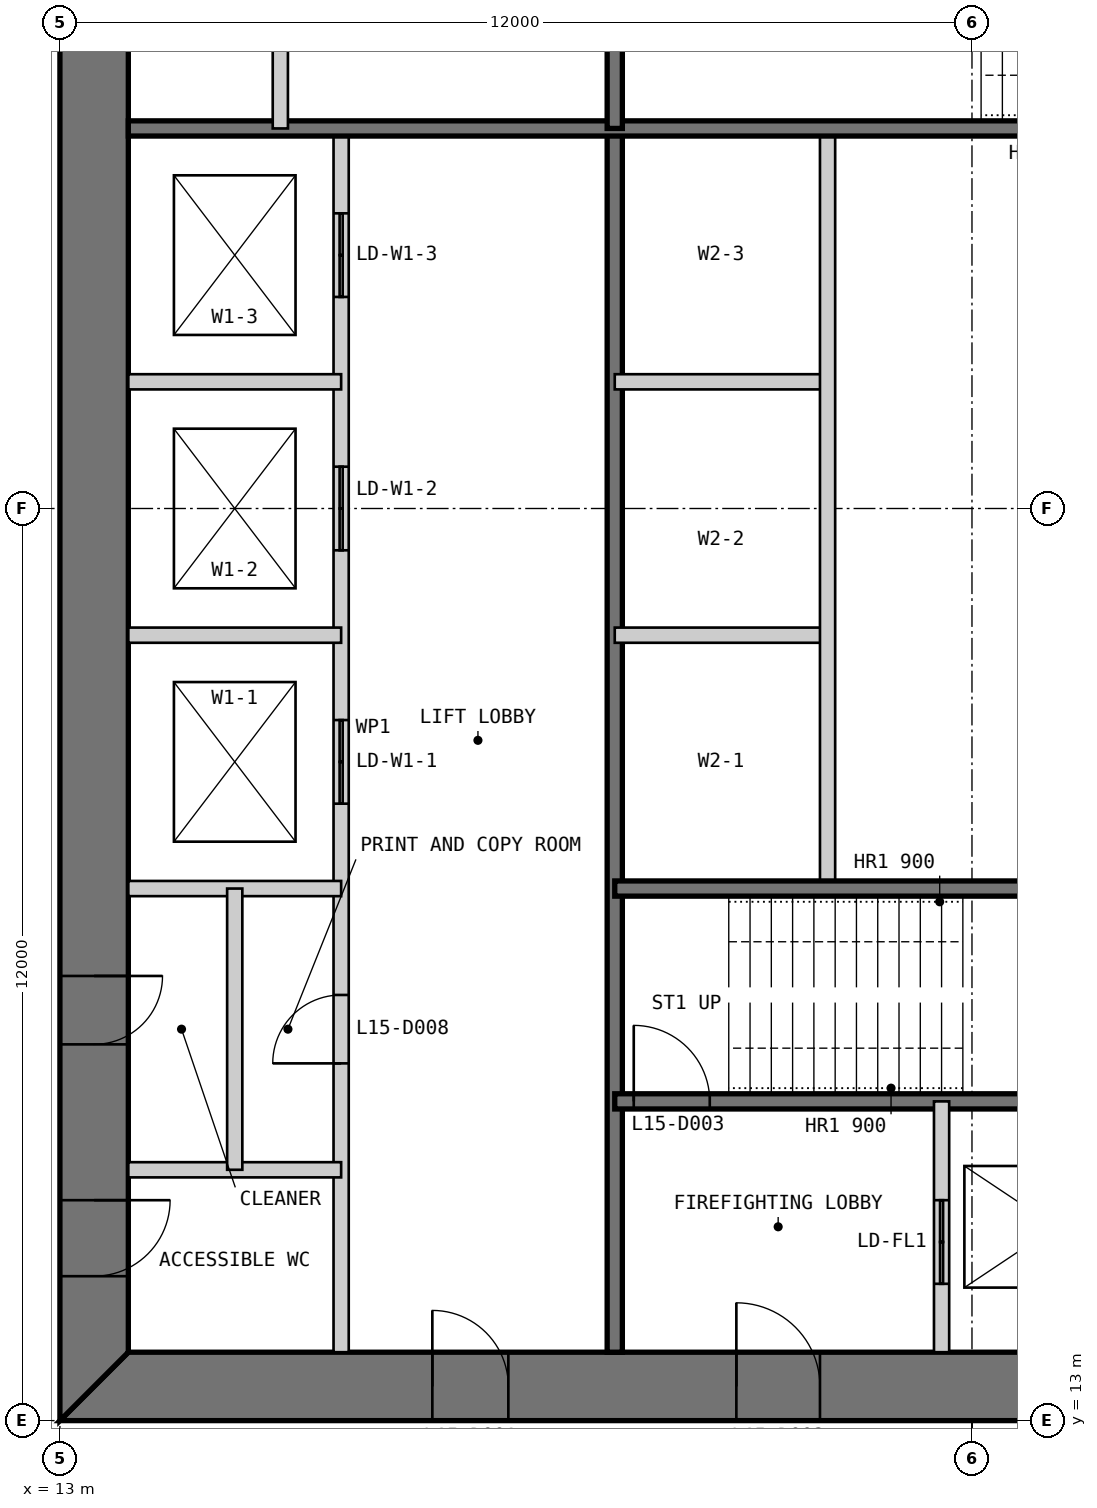
"""IFC4 building model, lengths in metres.
Left out: names, types, materials, properties, quantities, classifications, styles, units other than length and angle.
Written with IfcOpenShell. Run it as: python <this file> out.ifc"""

import sys

from ifc_helpers import new_model, si_unit, direction, frame, frame_2d, origin, place, context, subcontext, project, spatial, polyline, rectangle, outline, extrude, element, fill, save


model = new_model("IFC4")
c1 = context("Model", 3, precision=1e-05, world=origin(), true_north=direction((0.0, 1.0)))
c2 = subcontext(c1, "Body", "Model", "MODEL_VIEW")
j1 = project(units=[si_unit("LENGTHUNIT", "METRE"), si_unit("PLANEANGLEUNIT", "RADIAN")], contexts=[c1])
p1 = place(None, origin())
s1 = spatial("IfcSite", under=j1, at=p1, CompositionType="ELEMENT")
p2 = place(p1, origin())
s2 = spatial("IfcBuilding", under=s1, at=p2, CompositionType="ELEMENT")
p3 = place(p2, frame((0.0, 0.0, 67.0)))
s3 = spatial("IfcBuildingStorey", under=s2, at=p3, CompositionType="ELEMENT", Elevation=67.0)
p4 = place(p3, frame((13.0, 13.45, 0.0), z_axis=(0.0, 0.0, 1.0), x_axis=(1.0, 0.0, 0.0)))
e1 = element("IfcWall", 1, at=p4, inside=s3, PredefinedType="SHEAR", context=c2, shape_type="SweptSolid", body=[
    extrude(outline(polyline([(0.0, -0.45), (24.0, -0.45), (23.1, 0.45), (0.9, 0.45), (0.0, -0.45)])), origin(), (0.0, 0.0, 1.0), 4.0),
])
p5 = place(p4, frame((4.9, 0.0, 0.0)))
e2 = element("IfcOpeningElement", 2, at=p5, cuts=e1, PredefinedType="OPENING", context=c2, shape_type="SweptSolid", body=[
    extrude(rectangle(XDim=1.0, YDim=2.2, at=frame_2d((0.5, 1.1))), frame((0.0, 0.46, 0.0), z_axis=(0.0, -1.0, 0.0), x_axis=(1.0, 0.0, 0.0)), (0.0, 0.0, 1.0), 0.92),
])
p6 = place(p4, frame((8.9, 0.0, 0.0)))
e3 = element("IfcOpeningElement", 3, at=p6, cuts=e1, PredefinedType="OPENING", context=c2, shape_type="SweptSolid", body=[
    extrude(rectangle(XDim=1.1, YDim=2.2, at=frame_2d((0.55, 1.1))), frame((0.0, 0.46, 0.0), z_axis=(0.0, -1.0, 0.0), x_axis=(1.0, 0.0, 0.0)), (0.0, 0.0, 1.0), 0.92),
])
p7 = place(p4, frame((15.05, 0.0, 0.0)))
e4 = element("IfcOpeningElement", 4, at=p7, cuts=e1, PredefinedType="OPENING", context=c2, shape_type="SweptSolid", body=[
    extrude(rectangle(XDim=0.9, YDim=2.2, at=frame_2d((0.45, 1.1))), frame((0.0, 0.46, 0.0), z_axis=(0.0, -1.0, 0.0), x_axis=(1.0, 0.0, 0.0)), (0.0, 0.0, 1.0), 0.92),
])
p8 = place(p4, frame((17.9, 0.0, 0.0)))
e5 = element("IfcOpeningElement", 5, at=p8, cuts=e1, PredefinedType="OPENING", context=c2, shape_type="SweptSolid", body=[
    extrude(rectangle(XDim=1.0, YDim=2.2, at=frame_2d((0.5, 1.1))), frame((0.0, 0.46, 0.0), z_axis=(0.0, -1.0, 0.0), x_axis=(1.0, 0.0, 0.0)), (0.0, 0.0, 1.0), 0.92),
])
p9 = place(p4, frame((21.4, 0.0, 0.0)))
e6 = element("IfcOpeningElement", 6, at=p9, cuts=e1, PredefinedType="OPENING", context=c2, shape_type="SweptSolid", body=[
    extrude(rectangle(XDim=1.0, YDim=2.2, at=frame_2d((0.5, 1.1))), frame((0.0, 0.46, 0.0), z_axis=(0.0, -1.0, 0.0), x_axis=(1.0, 0.0, 0.0)), (0.0, 0.0, 1.0), 0.92),
])
p10 = place(p3, frame((13.45, 36.1, 0.0), z_axis=(0.0, 0.0, 1.0), x_axis=(0.0, -1.0, 0.0)))
e7 = element("IfcWall", 7, at=p10, inside=s3, PredefinedType="SHEAR", context=c2, shape_type="SweptSolid", body=[
    extrude(outline(polyline([(-0.9, -0.45), (23.1, -0.45), (22.2, 0.45), (0.0, 0.45), (-0.9, -0.45)])), origin(), (0.0, 0.0, 1.0), 4.0),
])
p11 = place(p10, frame((20.2, 0.0, 0.0)))
e8 = element("IfcOpeningElement", 8, at=p11, cuts=e7, PredefinedType="OPENING", context=c2, shape_type="SweptSolid", body=[
    extrude(rectangle(XDim=1.0, YDim=2.2, at=frame_2d((0.5, 1.1))), frame((0.0, 0.46, 0.0), z_axis=(0.0, -1.0, 0.0), x_axis=(1.0, 0.0, 0.0)), (0.0, 0.0, 1.0), 0.92),
])
p12 = place(p10, frame((17.25, 0.0, 0.0)))
e9 = element("IfcOpeningElement", 9, at=p12, cuts=e7, PredefinedType="OPENING", context=c2, shape_type="SweptSolid", body=[
    extrude(rectangle(XDim=0.9, YDim=2.2, at=frame_2d((0.45, 1.1))), frame((0.0, 0.46, 0.0), z_axis=(0.0, -1.0, 0.0), x_axis=(1.0, 0.0, 0.0)), (0.0, 0.0, 1.0), 0.92),
])
p13 = place(p3, frame((16.7, 13.9, 0.0), z_axis=(0.0, 0.0, 1.0), x_axis=(0.0, 1.0, 0.0)))
e10 = element("IfcWall", 10, at=p13, inside=s3, PredefinedType="PARTITIONING", context=c2, shape_type="SweptSolid", body=[
    extrude(rectangle(XDim=16.1, YDim=0.2, at=frame_2d((8.05, 0.0))), origin(), (0.0, 0.0, 1.0), 3.8),
])
p14 = place(p13, frame((3.8, 0.0, 0.0)))
e11 = element("IfcOpeningElement", 11, at=p14, cuts=e10, PredefinedType="OPENING", context=c2, shape_type="SweptSolid", body=[
    extrude(rectangle(XDim=0.9, YDim=2.2, at=frame_2d((0.45, 1.1))), frame((0.0, 0.11, 0.0), z_axis=(0.0, -1.0, 0.0), x_axis=(1.0, 0.0, 0.0)), (0.0, 0.0, 1.0), 0.22),
])
p15 = place(p13, frame((7.217, 0.0, 0.0)))
e12 = element("IfcOpeningElement", 12, at=p15, cuts=e10, PredefinedType="OPENING", context=c2, shape_type="SweptSolid", body=[
    extrude(rectangle(XDim=1.1, YDim=2.2, at=frame_2d((0.55, 1.1))), frame((0.0, 0.11, 0.0), z_axis=(0.0, -1.0, 0.0), x_axis=(1.0, 0.0, 0.0)), (0.0, 0.0, 1.0), 0.22),
])
p16 = place(p13, frame((10.55, 0.0, 0.0)))
e13 = element("IfcOpeningElement", 13, at=p16, cuts=e10, PredefinedType="OPENING", context=c2, shape_type="SweptSolid", body=[
    extrude(rectangle(XDim=1.1, YDim=2.2, at=frame_2d((0.55, 1.1))), frame((0.0, 0.11, 0.0), z_axis=(0.0, -1.0, 0.0), x_axis=(1.0, 0.0, 0.0)), (0.0, 0.0, 1.0), 0.22),
])
p17 = place(p13, frame((13.883, 0.0, 0.0)))
e14 = element("IfcOpeningElement", 14, at=p17, cuts=e10, PredefinedType="OPENING", context=c2, shape_type="SweptSolid", body=[
    extrude(rectangle(XDim=1.1, YDim=2.2, at=frame_2d((0.55, 1.1))), frame((0.0, 0.11, 0.0), z_axis=(0.0, -1.0, 0.0), x_axis=(1.0, 0.0, 0.0)), (0.0, 0.0, 1.0), 0.22),
])
p18 = place(p3, frame((20.3, 13.9, 0.0), z_axis=(0.0, 0.0, 1.0), x_axis=(0.0, 1.0, 0.0)))
e15 = element("IfcWall", 15, at=p18, inside=s3, PredefinedType="SOLIDWALL", context=c2, shape_type="SweptSolid", body=[
    extrude(rectangle(XDim=16.1, YDim=0.2, at=frame_2d((8.05, 0.0))), origin(), (0.0, 0.0, 1.0), 3.8),
])
for number, where, z_axis, x_axis in (
    (16, (13.9, 20.0, 0.0), (0.0, 0.0, 1.0), (1.0, 0.0, 0.0)),
    (17, (13.9, 23.333, 0.0), (0.0, 0.0, 1.0), (1.0, 0.0, 0.0)),
    (18, (13.9, 26.667, 0.0), (0.0, 0.0, 1.0), (1.0, 0.0, 0.0)),
    (19, (20.3, 23.333, 0.0), (0.0, 0.0, 1.0), (1.0, 0.0, 0.0)),
    (20, (20.3, 26.667, 0.0), (0.0, 0.0, 1.0), (1.0, 0.0, 0.0)),
):
    element("IfcWall", number, at=place(p3, frame(where, z_axis=z_axis, x_axis=x_axis)), inside=s3, PredefinedType="PARTITIONING", context=c2, shape_type="SweptSolid", body=[
        extrude(rectangle(XDim=2.8, YDim=0.2, at=frame_2d((1.4, 0.0))), origin(), (0.0, 0.0, 1.0), 3.8),
    ])
p19 = place(p3, frame((23.1, 20.0, 0.0), z_axis=(0.0, 0.0, 1.0), x_axis=(0.0, 1.0, 0.0)))
e21 = element("IfcWall", 21, at=p19, inside=s3, PredefinedType="PARTITIONING", context=c2, shape_type="SweptSolid", body=[
    extrude(rectangle(XDim=10.0, YDim=0.2, at=frame_2d((5.0, 0.0))), origin(), (0.0, 0.0, 1.0), 3.8),
])
p20 = place(p3, frame((20.3, 17.2, 0.0), z_axis=(0.0, 0.0, 1.0), x_axis=(1.0, 0.0, 0.0)))
e22 = element("IfcWall", 22, at=p20, inside=s3, PredefinedType="SOLIDWALL", context=c2, shape_type="SweptSolid", body=[
    extrude(rectangle(XDim=9.4, YDim=0.2, at=frame_2d((4.7, 0.0))), origin(), (0.0, 0.0, 1.0), 3.8),
])
p21 = place(p20, frame((0.25, 0.0, 0.0)))
e23 = element("IfcOpeningElement", 23, at=p21, cuts=e22, PredefinedType="OPENING", context=c2, shape_type="SweptSolid", body=[
    extrude(rectangle(XDim=1.0, YDim=2.2, at=frame_2d((0.5, 1.1))), frame((0.0, 0.11, 0.0), z_axis=(0.0, -1.0, 0.0), x_axis=(1.0, 0.0, 0.0)), (0.0, 0.0, 1.0), 0.22),
])
p22 = place(p3, frame((20.3, 20.0, 0.0), z_axis=(0.0, 0.0, 1.0), x_axis=(1.0, 0.0, 0.0)))
e24 = element("IfcWall", 24, at=p22, inside=s3, PredefinedType="SOLIDWALL", context=c2, shape_type="SweptSolid", body=[
    extrude(rectangle(XDim=15.8, YDim=0.2, at=frame_2d((7.9, 0.0))), origin(), (0.0, 0.0, 1.0), 3.8),
])
p23 = place(p3, frame((24.6, 13.9, 0.0), z_axis=(0.0, 0.0, 1.0), x_axis=(0.0, 1.0, 0.0)))
e25 = element("IfcWall", 25, at=p23, inside=s3, PredefinedType="PARTITIONING", context=c2, shape_type="SweptSolid", body=[
    extrude(rectangle(XDim=3.3, YDim=0.2, at=frame_2d((1.65, 0.0))), origin(), (0.0, 0.0, 1.0), 3.8),
])
p24 = place(p23, frame((0.9, 0.0, 0.0)))
e26 = element("IfcOpeningElement", 26, at=p24, cuts=e25, PredefinedType="OPENING", context=c2, shape_type="SweptSolid", body=[
    extrude(rectangle(XDim=1.1, YDim=2.2, at=frame_2d((0.55, 1.1))), frame((0.0, 0.11, 0.0), z_axis=(0.0, -1.0, 0.0), x_axis=(1.0, 0.0, 0.0)), (0.0, 0.0, 1.0), 0.22),
])
p25 = place(p3, frame((13.9, 16.3, 0.0), z_axis=(0.0, 0.0, 1.0), x_axis=(1.0, 0.0, 0.0)))
e27 = element("IfcWall", 27, at=p25, inside=s3, PredefinedType="PARTITIONING", context=c2, shape_type="SweptSolid", body=[
    extrude(rectangle(XDim=2.8, YDim=0.2, at=frame_2d((1.4, 0.0))), origin(), (0.0, 0.0, 1.0), 3.8),
])
p26 = place(p3, frame((15.3, 16.3, 0.0), z_axis=(0.0, 0.0, 1.0), x_axis=(0.0, 1.0, 0.0)))
e28 = element("IfcWall", 28, at=p26, inside=s3, PredefinedType="PARTITIONING", context=c2, shape_type="SweptSolid", body=[
    extrude(rectangle(XDim=3.7, YDim=0.2, at=frame_2d((1.85, 0.0))), origin(), (0.0, 0.0, 1.0), 3.8),
])
p27 = place(p3, frame((29.7, 30.0, 0.0), z_axis=(0.0, 0.0, 1.0), x_axis=(-1.0, 0.0, 0.0)))
e29 = element("IfcWall", 29, at=p27, inside=s3, PredefinedType="SOLIDWALL", context=c2, shape_type="SweptSolid", body=[
    extrude(rectangle(XDim=15.8, YDim=0.2, at=frame_2d((7.9, 0.0))), origin(), (0.0, 0.0, 1.0), 3.8),
])
p28 = place(p3, frame((20.3, 36.1, 0.0), z_axis=(0.0, 0.0, 1.0), x_axis=(0.0, -1.0, 0.0)))
e30 = element("IfcWall", 30, at=p28, inside=s3, PredefinedType="SOLIDWALL", context=c2, shape_type="SweptSolid", body=[
    extrude(rectangle(XDim=6.1, YDim=0.2, at=frame_2d((3.05, 0.0))), origin(), (0.0, 0.0, 1.0), 3.8),
])
p29 = place(p3, frame((15.9, 36.1, 0.0), z_axis=(0.0, 0.0, 1.0), x_axis=(0.0, -1.0, 0.0)))
e31 = element("IfcWall", 31, at=p29, inside=s3, PredefinedType="PARTITIONING", context=c2, shape_type="SweptSolid", body=[
    extrude(rectangle(XDim=6.1, YDim=0.2, at=frame_2d((3.05, 0.0))), origin(), (0.0, 0.0, 1.0), 3.8),
])
p30 = place(p5, origin())
e32 = element("IfcDoor", 32, at=p30, inside=s3, OperationType="SINGLE_SWING_LEFT", PredefinedType="DOOR", context=c2, shape_type="SweptSolid", body=[
    extrude(rectangle(XDim=1.0, YDim=2.2, at=frame_2d((0.5, 1.1))), frame((0.0, 0.025, 0.0), z_axis=(0.0, -1.0, 0.0), x_axis=(1.0, 0.0, 0.0)), (0.0, 0.0, 1.0), 0.05),
    extrude(outline(polyline([(0.0, 0.0), (0.04, 0.0), (0.04, 2.16), (0.96, 2.16), (0.96, 0.0), (1.0, 0.0), (1.0, 2.2), (0.0, 2.2), (0.0, 0.0)])), frame((0.0, 0.3, 0.0), z_axis=(0.0, -1.0, 0.0), x_axis=(1.0, 0.0, 0.0)), (0.0, 0.0, 1.0), 0.6),
])
fill(e2, e32)
p31 = place(p6, origin())
e33 = element("IfcDoor", 33, at=p31, inside=s3, OperationType="SINGLE_SWING_LEFT", PredefinedType="DOOR", context=c2, shape_type="SweptSolid", body=[
    extrude(rectangle(XDim=1.1, YDim=2.2, at=frame_2d((0.55, 1.1))), frame((0.0, 0.025, 0.0), z_axis=(0.0, -1.0, 0.0), x_axis=(1.0, 0.0, 0.0)), (0.0, 0.0, 1.0), 0.05),
    extrude(outline(polyline([(0.0, 0.0), (0.04, 0.0), (0.04, 2.16), (1.06, 2.16), (1.06, 0.0), (1.1, 0.0), (1.1, 2.2), (0.0, 2.2), (0.0, 0.0)])), frame((0.0, 0.3, 0.0), z_axis=(0.0, -1.0, 0.0), x_axis=(1.0, 0.0, 0.0)), (0.0, 0.0, 1.0), 0.6),
])
fill(e3, e33)
p32 = place(p21, origin())
e34 = element("IfcDoor", 34, at=p32, inside=s3, OperationType="SINGLE_SWING_LEFT", PredefinedType="DOOR", context=c2, shape_type="SweptSolid", body=[
    extrude(rectangle(XDim=1.0, YDim=2.2, at=frame_2d((0.5, 1.1))), frame((0.0, 0.025, 0.0), z_axis=(0.0, -1.0, 0.0), x_axis=(1.0, 0.0, 0.0)), (0.0, 0.0, 1.0), 0.05),
])
fill(e23, e34)
p33 = place(p11, origin())
e35 = element("IfcDoor", 35, at=p33, inside=s3, OperationType="SINGLE_SWING_LEFT", PredefinedType="DOOR", context=c2, shape_type="SweptSolid", body=[
    extrude(rectangle(XDim=1.0, YDim=2.2, at=frame_2d((0.5, 1.1))), frame((0.0, 0.025, 0.0), z_axis=(0.0, -1.0, 0.0), x_axis=(1.0, 0.0, 0.0)), (0.0, 0.0, 1.0), 0.05),
    extrude(outline(polyline([(0.0, 0.0), (0.04, 0.0), (0.04, 2.16), (0.96, 2.16), (0.96, 0.0), (1.0, 0.0), (1.0, 2.2), (0.0, 2.2), (0.0, 0.0)])), frame((0.0, 0.3, 0.0), z_axis=(0.0, -1.0, 0.0), x_axis=(1.0, 0.0, 0.0)), (0.0, 0.0, 1.0), 0.6),
])
fill(e8, e35)
p34 = place(p14, origin())
e36 = element("IfcDoor", 36, at=p34, inside=s3, OperationType="SINGLE_SWING_LEFT", PredefinedType="DOOR", context=c2, shape_type="SweptSolid", body=[
    extrude(rectangle(XDim=0.9, YDim=2.2, at=frame_2d((0.45, 1.1))), frame((0.0, 0.025, 0.0), z_axis=(0.0, -1.0, 0.0), x_axis=(1.0, 0.0, 0.0)), (0.0, 0.0, 1.0), 0.05),
])
fill(e11, e36)
p35 = place(p12, origin())
e37 = element("IfcDoor", 37, at=p35, inside=s3, OperationType="SINGLE_SWING_LEFT", PredefinedType="DOOR", context=c2, shape_type="SweptSolid", body=[
    extrude(rectangle(XDim=0.9, YDim=2.2, at=frame_2d((0.45, 1.1))), frame((0.0, 0.025, 0.0), z_axis=(0.0, -1.0, 0.0), x_axis=(1.0, 0.0, 0.0)), (0.0, 0.0, 1.0), 0.05),
    extrude(outline(polyline([(0.0, 0.0), (0.04, 0.0), (0.04, 2.16), (0.86, 2.16), (0.86, 0.0), (0.9, 0.0), (0.9, 2.2), (0.0, 2.2), (0.0, 0.0)])), frame((0.0, 0.3, 0.0), z_axis=(0.0, -1.0, 0.0), x_axis=(1.0, 0.0, 0.0)), (0.0, 0.0, 1.0), 0.6),
])
fill(e9, e37)
p36 = place(p24, origin())
e38 = element("IfcDoor", 38, at=p36, inside=s3, OperationType="DOUBLE_DOOR_SLIDING", PredefinedType="DOOR", context=c2, shape_type="SweptSolid", body=[
    extrude(rectangle(XDim=1.1, YDim=2.2, at=frame_2d((0.55, 1.1))), frame((0.0, 0.025, 0.0), z_axis=(0.0, -1.0, 0.0), x_axis=(1.0, 0.0, 0.0)), (0.0, 0.0, 1.0), 0.05),
])
fill(e26, e38)
p37 = place(p15, origin())
e39 = element("IfcDoor", 39, at=p37, inside=s3, OperationType="DOUBLE_DOOR_SLIDING", PredefinedType="DOOR", context=c2, shape_type="SweptSolid", body=[
    extrude(rectangle(XDim=1.1, YDim=2.2, at=frame_2d((0.55, 1.1))), frame((0.0, 0.025, 0.0), z_axis=(0.0, -1.0, 0.0), x_axis=(1.0, 0.0, 0.0)), (0.0, 0.0, 1.0), 0.05),
])
fill(e12, e39)
p38 = place(p16, origin())
e40 = element("IfcDoor", 40, at=p38, inside=s3, OperationType="DOUBLE_DOOR_SLIDING", PredefinedType="DOOR", context=c2, shape_type="SweptSolid", body=[
    extrude(rectangle(XDim=1.1, YDim=2.2, at=frame_2d((0.55, 1.1))), frame((0.0, 0.025, 0.0), z_axis=(0.0, -1.0, 0.0), x_axis=(1.0, 0.0, 0.0)), (0.0, 0.0, 1.0), 0.05),
])
fill(e13, e40)
p39 = place(p17, origin())
e41 = element("IfcDoor", 41, at=p39, inside=s3, OperationType="DOUBLE_DOOR_SLIDING", PredefinedType="DOOR", context=c2, shape_type="SweptSolid", body=[
    extrude(rectangle(XDim=1.1, YDim=2.2, at=frame_2d((0.55, 1.1))), frame((0.0, 0.025, 0.0), z_axis=(0.0, -1.0, 0.0), x_axis=(1.0, 0.0, 0.0)), (0.0, 0.0, 1.0), 0.05),
])
fill(e14, e41)
save(model, sys.argv[1])
